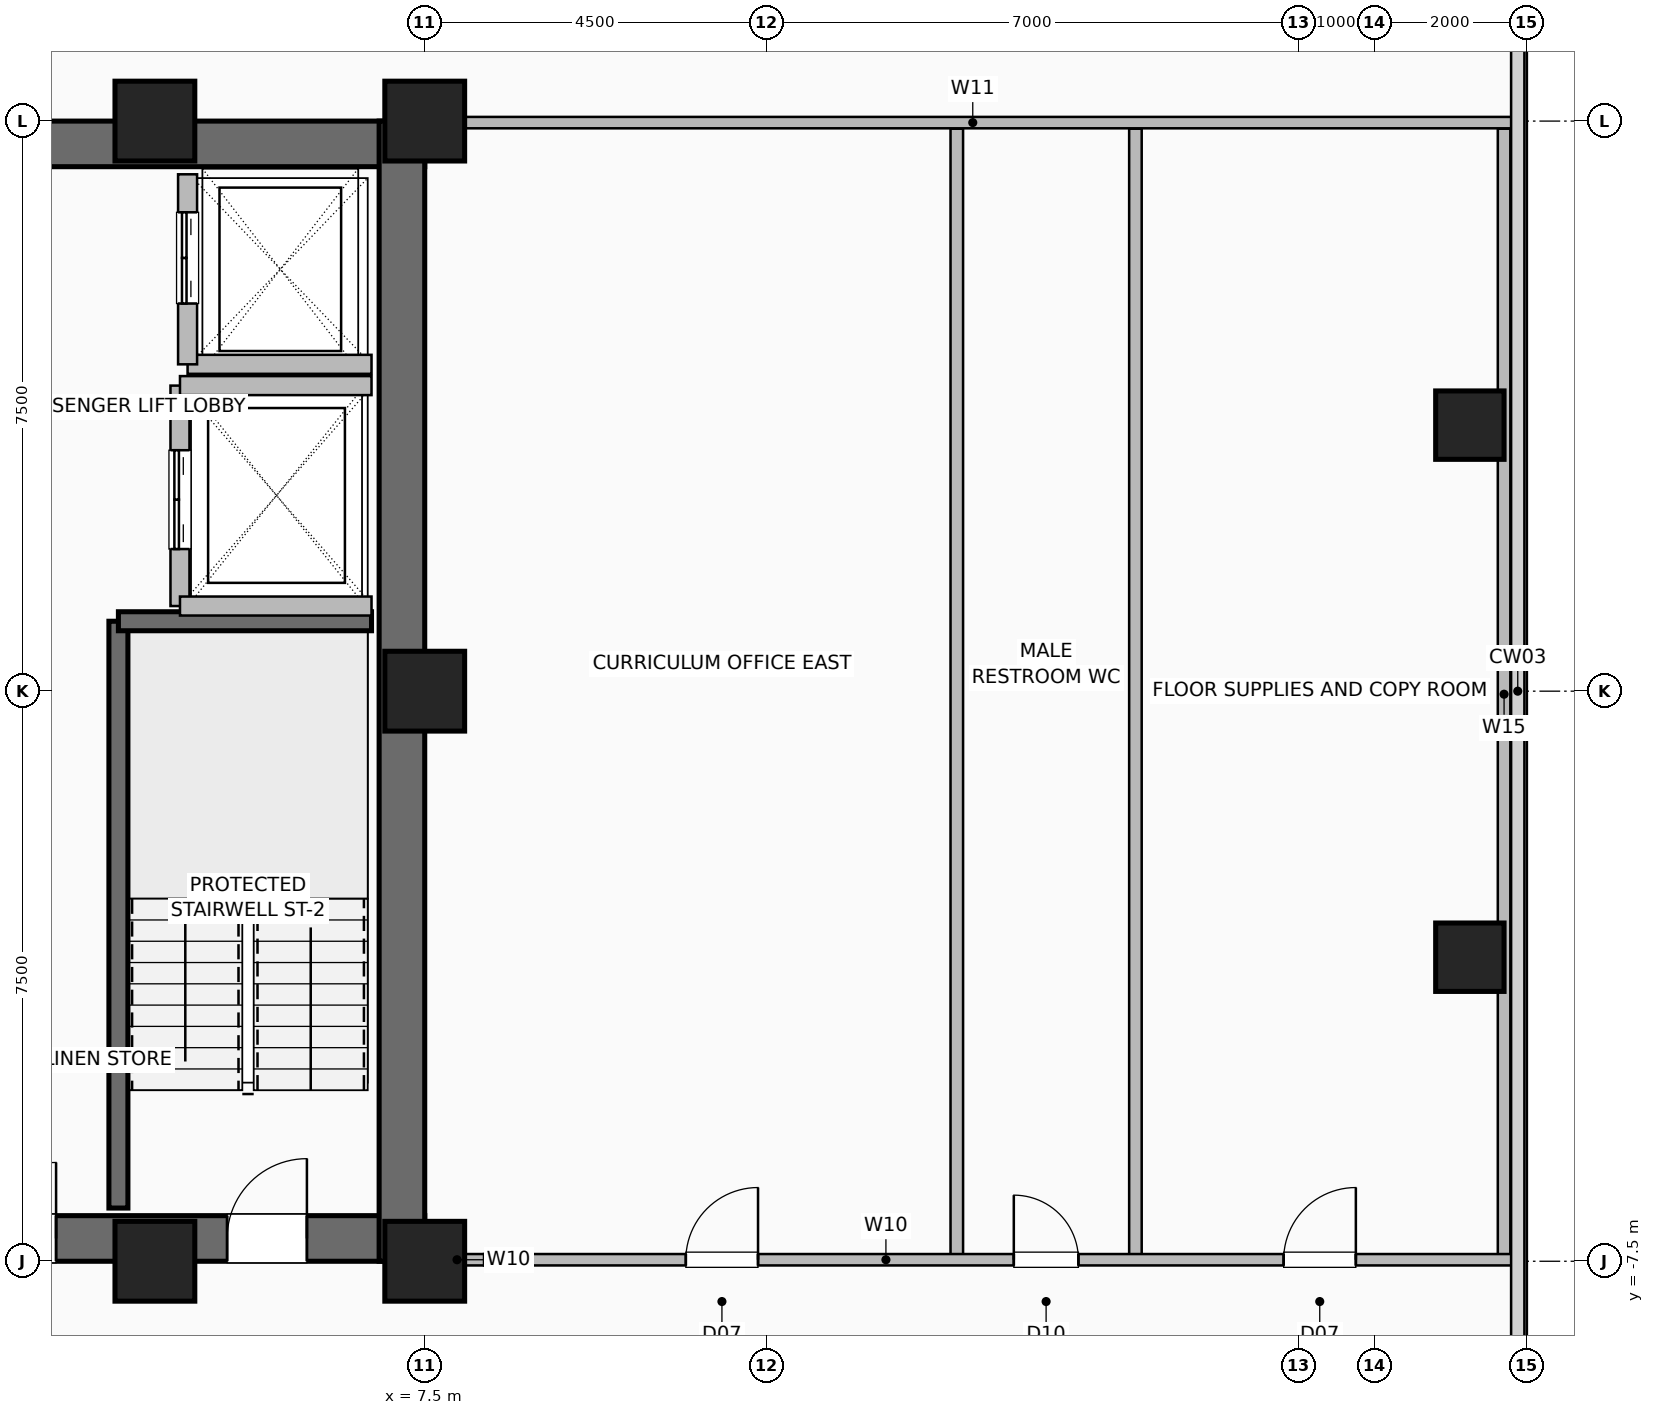
"""IFC4 building model, lengths in metres.
Left out: names, types, materials, properties, quantities, classifications, styles, units other than length and angle.
Written with IfcOpenShell. Run it as: python <this file> out.ifc"""

import sys

from ifc_helpers import new_model, si_unit, direction, frame, frame_2d, origin, origin_2d, place, context, subcontext, project, spatial, rectangle, hollow_rectangle, extrude, element, fill, save


model = new_model("IFC4")
c1 = context("Model", 3, precision=1e-05, world=origin(), true_north=direction((0.0, 1.0)))
c2 = subcontext(c1, "Body", "Model", "MODEL_VIEW")
j1 = project(units=[si_unit("LENGTHUNIT", "METRE"), si_unit("PLANEANGLEUNIT", "RADIAN")], contexts=[c1])
p1 = place(None, origin())
s1 = spatial("IfcSite", under=j1, at=p1, CompositionType="ELEMENT")
p2 = place(p1, origin())
s2 = spatial("IfcBuilding", under=s1, at=p2, CompositionType="ELEMENT")
p3 = place(p2, frame((0.0, 0.0, 130.0)))
s3 = spatial("IfcBuildingStorey", under=s2, at=p3, CompositionType="ELEMENT", Elevation=130.0)
for number, where, z_axis, x_axis in (
    (1, (3.95, -7.5, 0.0), (0.0, 0.0, 1.0), (1.0, 0.0, 0.0)),
    (2, (7.5, -7.5, 0.0), (0.0, 0.0, 1.0), (1.0, 0.0, 0.0)),
    (3, (7.5, 0.0, 0.0), (0.0, 0.0, 1.0), (1.0, 0.0, 0.0)),
    (4, (7.5, 7.5, 0.0), (0.0, 0.0, 1.0), (1.0, 0.0, 0.0)),
    (5, (3.95, 7.5, 0.0), (0.0, 0.0, 1.0), (1.0, 0.0, 0.0)),
):
    element("IfcColumn", number, at=place(p3, frame(where, z_axis=z_axis, x_axis=x_axis)), inside=s3, PredefinedType="COLUMN", context=c2, shape_type="SweptSolid", body=[
        extrude(hollow_rectangle(XDim=1.05, YDim=1.05, WallThickness=0.05, at=origin_2d()), origin(), (0.0, 0.0, 1.0), 3.6),
    ])
for number, where, z_axis, x_axis in (
    (6, (21.25, -3.5, 0.0), (0.0, 0.0, 1.0), (1.0, 0.0, 0.0)),
    (7, (21.25, 3.5, 0.0), (0.0, 0.0, 1.0), (1.0, 0.0, 0.0)),
):
    element("IfcColumn", number, at=place(p3, frame(where, z_axis=z_axis, x_axis=x_axis)), inside=s3, PredefinedType="COLUMN", context=c2, shape_type="SweptSolid", body=[
        extrude(hollow_rectangle(XDim=0.9, YDim=0.9, WallThickness=0.045, at=origin_2d()), origin(), (0.0, 0.0, 1.0), 3.6),
    ])
p4 = place(p3, frame((-7.5, -7.2, 0.0), z_axis=(0.0, 0.0, 1.0), x_axis=(1.0, 0.0, 0.0)))
e8 = element("IfcWall", 8, at=p4, inside=s3, PredefinedType="SHEAR", context=c2, shape_type="SweptSolid", body=[
    extrude(rectangle(XDim=15.0, YDim=0.6, at=frame_2d((7.5, 0.0))), origin(), (0.0, 0.0, 1.0), 3.36),
])
p5 = place(p4, frame((1.55, 0.0, 0.0)))
e9 = element("IfcOpeningElement", 9, at=p5, cuts=e8, PredefinedType="OPENING", context=c2, shape_type="SweptSolid", body=[
    extrude(rectangle(XDim=1.05, YDim=2.08, at=frame_2d((0.525, 1.04))), frame((0.0, 0.31, 0.0), z_axis=(0.0, -1.0, 0.0), x_axis=(1.0, 0.0, 0.0)), (0.0, 0.0, 1.0), 0.62),
])
p6 = place(p4, frame((12.4, 0.0, 0.0)))
e10 = element("IfcOpeningElement", 10, at=p6, cuts=e8, PredefinedType="OPENING", context=c2, shape_type="SweptSolid", body=[
    extrude(rectangle(XDim=1.05, YDim=2.08, at=frame_2d((0.525, 1.04))), frame((0.0, 0.31, 0.0), z_axis=(0.0, -1.0, 0.0), x_axis=(1.0, 0.0, 0.0)), (0.0, 0.0, 1.0), 0.62),
])
p7 = place(p4, frame((4.95, 0.0, 0.0)))
e11 = element("IfcOpeningElement", 11, at=p7, cuts=e8, PredefinedType="OPENING", context=c2, shape_type="SweptSolid", body=[
    extrude(rectangle(XDim=1.0, YDim=2.08, at=frame_2d((0.5, 1.04))), frame((0.0, 0.31, 0.0), z_axis=(0.0, -1.0, 0.0), x_axis=(1.0, 0.0, 0.0)), (0.0, 0.0, 1.0), 0.62),
])
p8 = place(p4, frame((7.05, 0.0, 0.0)))
e12 = element("IfcOpeningElement", 12, at=p8, cuts=e8, PredefinedType="OPENING", context=c2, shape_type="SweptSolid", body=[
    extrude(rectangle(XDim=1.0, YDim=2.08, at=frame_2d((0.5, 1.04))), frame((0.0, 0.31, 0.0), z_axis=(0.0, -1.0, 0.0), x_axis=(1.0, 0.0, 0.0)), (0.0, 0.0, 1.0), 0.62),
])
p9 = place(p4, frame((9.15, 0.0, 0.0)))
e13 = element("IfcOpeningElement", 13, at=p9, cuts=e8, PredefinedType="OPENING", context=c2, shape_type="SweptSolid", body=[
    extrude(rectangle(XDim=1.0, YDim=2.08, at=frame_2d((0.5, 1.04))), frame((0.0, 0.31, 0.0), z_axis=(0.0, -1.0, 0.0), x_axis=(1.0, 0.0, 0.0)), (0.0, 0.0, 1.0), 0.62),
])
for number, where, z_axis, x_axis in (
    (14, (-7.5, 7.2, 0.0), (0.0, 0.0, 1.0), (1.0, 0.0, 0.0)),
    (15, (7.2, -7.5, 0.0), (0.0, 0.0, 1.0), (0.0, 1.0, 0.0)),
):
    element("IfcWall", number, at=place(p3, frame(where, z_axis=z_axis, x_axis=x_axis)), inside=s3, PredefinedType="SHEAR", context=c2, shape_type="SweptSolid", body=[
        extrude(rectangle(XDim=15.0, YDim=0.6, at=frame_2d((7.5, 0.0))), origin(), (0.0, 0.0, 1.0), 3.36),
    ])
p10 = place(p3, frame((3.47, -6.8, 0.0), z_axis=(0.0, 0.0, 1.0), x_axis=(0.0, 1.0, 0.0)))
e16 = element("IfcWall", 16, at=p10, inside=s3, PredefinedType="SHEAR", context=c2, shape_type="SweptSolid", body=[
    extrude(rectangle(XDim=7.72, YDim=0.25, at=frame_2d((3.86, 0.0))), origin(), (0.0, 0.0, 1.0), 3.36),
])
p11 = place(p3, frame((3.47, 0.92, 0.0), z_axis=(0.0, 0.0, 1.0), x_axis=(1.0, 0.0, 0.0)))
e17 = element("IfcWall", 17, at=p11, inside=s3, PredefinedType="SHEAR", context=c2, shape_type="SweptSolid", body=[
    extrude(rectangle(XDim=3.33, YDim=0.25, at=frame_2d((1.665, 0.0))), origin(), (0.0, 0.0, 1.0), 3.36),
])
p12 = place(p3, frame((4.38, 4.3, 0.0), z_axis=(0.0, 0.0, 1.0), x_axis=(1.0, 0.0, 0.0)))
e18 = element("IfcWall", 18, at=p12, inside=s3, PredefinedType="SHEAR", context=c2, shape_type="SweptSolid", body=[
    extrude(rectangle(XDim=2.42, YDim=0.25, at=frame_2d((1.21, 0.0))), origin(), (0.0, 0.0, 1.0), 3.36),
])
p13 = place(p3, frame((4.38, 4.3, 0.0), z_axis=(0.0, 0.0, 1.0), x_axis=(0.0, 1.0, 0.0)))
e19 = element("IfcWall", 19, at=p13, inside=s3, PredefinedType="SHEAR", context=c2, shape_type="SweptSolid", body=[
    extrude(rectangle(XDim=2.5, YDim=0.25, at=frame_2d((1.25, 0.0))), origin(), (0.0, 0.0, 1.0), 3.36),
])
p14 = place(p13, frame((0.8, 0.0, 0.0)))
e20 = element("IfcOpeningElement", 20, at=p14, cuts=e19, PredefinedType="OPENING", context=c2, shape_type="SweptSolid", body=[
    extrude(rectangle(XDim=1.2, YDim=2.2, at=frame_2d((0.6, 1.1))), frame((0.0, 0.135, 0.0), z_axis=(0.0, -1.0, 0.0), x_axis=(1.0, 0.0, 0.0)), (0.0, 0.0, 1.0), 0.27),
])
p15 = place(p3, frame((4.28, 1.12, 0.0), z_axis=(0.0, 0.0, 1.0), x_axis=(0.0, 1.0, 0.0)))
e21 = element("IfcWall", 21, at=p15, inside=s3, PredefinedType="SHEAR", context=c2, shape_type="SweptSolid", body=[
    extrude(rectangle(XDim=2.9, YDim=0.25, at=frame_2d((1.45, 0.0))), origin(), (0.0, 0.0, 1.0), 3.36),
])
p16 = place(p15, frame((0.75, 0.0, 0.0)))
e22 = element("IfcOpeningElement", 22, at=p16, cuts=e21, PredefinedType="OPENING", context=c2, shape_type="SweptSolid", body=[
    extrude(rectangle(XDim=1.3, YDim=2.3, at=frame_2d((0.65, 1.15))), frame((0.0, 0.135, 0.0), z_axis=(0.0, -1.0, 0.0), x_axis=(1.0, 0.0, 0.0)), (0.0, 0.0, 1.0), 0.27),
])
for number, where, z_axis, x_axis in (
    (23, (4.28, 1.12, 0.0), (0.0, 0.0, 1.0), (1.0, 0.0, 0.0)),
    (24, (4.28, 4.02, 0.0), (0.0, 0.0, 1.0), (1.0, 0.0, 0.0)),
):
    element("IfcWall", number, at=place(p3, frame(where, z_axis=z_axis, x_axis=x_axis)), inside=s3, PredefinedType="SHEAR", context=c2, shape_type="SweptSolid", body=[
        extrude(rectangle(XDim=2.52, YDim=0.25, at=frame_2d((1.26, 0.0))), origin(), (0.0, 0.0, 1.0), 3.36),
    ])
p17 = place(p3, frame((7.45, -7.48, 0.0), z_axis=(0.0, 0.0, 1.0), x_axis=(1.0, 0.0, 0.0)))
e25 = element("IfcWall", 25, at=p17, inside=s3, PredefinedType="PARTITIONING", context=c2, shape_type="SweptSolid", body=[
    extrude(rectangle(XDim=0.95, YDim=0.15, at=frame_2d((0.475, 0.0))), origin(), (0.0, 0.0, 1.0), 3.36),
])
for number, where, z_axis, x_axis in (
    (26, (16.85, -7.48, 0.0), (0.0, 0.0, 1.0), (0.0, 1.0, 0.0)),
    (27, (14.5, -7.48, 0.0), (0.0, 0.0, 1.0), (0.0, 1.0, 0.0)),
    (28, (21.7, -7.48, 0.0), (0.0, 0.0, 1.0), (0.0, 1.0, 0.0)),
):
    element("IfcWall", number, at=place(p3, frame(where, z_axis=z_axis, x_axis=x_axis)), inside=s3, PredefinedType="PLUMBINGWALL", context=c2, shape_type="SweptSolid", body=[
        extrude(rectangle(XDim=14.88, YDim=0.165, at=frame_2d((7.44, 0.0))), origin(), (0.0, 0.0, 1.0), 3.36),
    ])
p18 = place(p3, frame((8.28, -7.48, 0.0), z_axis=(0.0, 0.0, 1.0), x_axis=(1.0, 0.0, 0.0)))
e29 = element("IfcWall", 29, at=p18, inside=s3, PredefinedType="PARTITIONING", context=c2, shape_type="SweptSolid", body=[
    extrude(rectangle(XDim=13.54, YDim=0.15, at=frame_2d((6.77, 0.0))), origin(), (0.0, 0.0, 1.0), 3.36),
])
p19 = place(p18, frame((2.655, 0.0, 0.0)))
e30 = element("IfcOpeningElement", 30, at=p19, cuts=e29, PredefinedType="OPENING", context=c2, shape_type="SweptSolid", body=[
    extrude(rectangle(XDim=0.95, YDim=2.06, at=frame_2d((0.475, 1.03))), frame((0.0, 0.085, 0.0), z_axis=(0.0, -1.0, 0.0), x_axis=(1.0, 0.0, 0.0)), (0.0, 0.0, 1.0), 0.17),
])
p20 = place(p18, frame((6.97, 0.0, 0.0)))
e31 = element("IfcOpeningElement", 31, at=p20, cuts=e29, PredefinedType="OPENING", context=c2, shape_type="SweptSolid", body=[
    extrude(rectangle(XDim=0.85, YDim=2.05, at=frame_2d((0.425, 1.025))), frame((0.0, 0.085, 0.0), z_axis=(0.0, -1.0, 0.0), x_axis=(1.0, 0.0, 0.0)), (0.0, 0.0, 1.0), 0.17),
])
p21 = place(p18, frame((10.52, 0.0, 0.0)))
e32 = element("IfcOpeningElement", 32, at=p21, cuts=e29, PredefinedType="OPENING", context=c2, shape_type="SweptSolid", body=[
    extrude(rectangle(XDim=0.95, YDim=2.06, at=frame_2d((0.475, 1.03))), frame((0.0, 0.085, 0.0), z_axis=(0.0, -1.0, 0.0), x_axis=(1.0, 0.0, 0.0)), (0.0, 0.0, 1.0), 0.17),
])
p22 = place(p3, frame((7.6, 7.48, 0.0), z_axis=(0.0, 0.0, 1.0), x_axis=(1.0, 0.0, 0.0)))
e33 = element("IfcWall", 33, at=p22, inside=s3, PredefinedType="PARTITIONING", context=c2, shape_type="SweptSolid", body=[
    extrude(rectangle(XDim=14.22, YDim=0.15, at=frame_2d((7.11, 0.0))), origin(), (0.0, 0.0, 1.0), 3.36),
])
p23 = place(p6, origin())
e34 = element("IfcDoor", 34, at=p23, inside=s3, OperationType="SINGLE_SWING_RIGHT", PredefinedType="DOOR", context=c2, shape_type="SweptSolid", body=[
    extrude(rectangle(XDim=1.05, YDim=2.08, at=frame_2d((0.525, 1.04))), frame((0.0, 0.025, 0.0), z_axis=(0.0, -1.0, 0.0), x_axis=(1.0, 0.0, 0.0)), (0.0, 0.0, 1.0), 0.05),
])
fill(e10, e34)
p24 = place(p9, origin())
e35 = element("IfcDoor", 35, at=p24, inside=s3, OperationType="SINGLE_SWING_RIGHT", PredefinedType="DOOR", context=c2, shape_type="SweptSolid", body=[
    extrude(rectangle(XDim=1.0, YDim=2.08, at=frame_2d((0.5, 1.04))), frame((0.0, 0.025, 0.0), z_axis=(0.0, -1.0, 0.0), x_axis=(1.0, 0.0, 0.0)), (0.0, 0.0, 1.0), 0.05),
])
fill(e13, e35)
p25 = place(p14, origin())
e36 = element("IfcDoor", 36, at=p25, inside=s3, OperationType="DOUBLE_DOOR_SLIDING", PredefinedType="DOOR", context=c2, shape_type="SweptSolid", body=[
    extrude(rectangle(XDim=1.2, YDim=2.2, at=frame_2d((0.6, 1.1))), frame((0.0, 0.025, 0.0), z_axis=(0.0, -1.0, 0.0), x_axis=(1.0, 0.0, 0.0)), (0.0, 0.0, 1.0), 0.05),
])
fill(e20, e36)
p26 = place(p16, origin())
e37 = element("IfcDoor", 37, at=p26, inside=s3, OperationType="DOUBLE_DOOR_SLIDING", PredefinedType="DOOR", context=c2, shape_type="SweptSolid", body=[
    extrude(rectangle(XDim=1.3, YDim=2.3, at=frame_2d((0.65, 1.15))), frame((0.0, 0.025, 0.0), z_axis=(0.0, -1.0, 0.0), x_axis=(1.0, 0.0, 0.0)), (0.0, 0.0, 1.0), 0.05),
])
fill(e22, e37)
p27 = place(p19, origin())
e38 = element("IfcDoor", 38, at=p27, inside=s3, OperationType="SINGLE_SWING_RIGHT", PredefinedType="DOOR", context=c2, shape_type="SweptSolid", body=[
    extrude(rectangle(XDim=0.95, YDim=2.06, at=frame_2d((0.475, 1.03))), frame((0.0, 0.025, 0.0), z_axis=(0.0, -1.0, 0.0), x_axis=(1.0, 0.0, 0.0)), (0.0, 0.0, 1.0), 0.05),
])
fill(e30, e38)
p28 = place(p20, origin())
e39 = element("IfcDoor", 39, at=p28, inside=s3, OperationType="SINGLE_SWING_LEFT", PredefinedType="DOOR", context=c2, shape_type="SweptSolid", body=[
    extrude(rectangle(XDim=0.85, YDim=2.05, at=frame_2d((0.425, 1.025))), frame((0.0, 0.025, 0.0), z_axis=(0.0, -1.0, 0.0), x_axis=(1.0, 0.0, 0.0)), (0.0, 0.0, 1.0), 0.05),
])
fill(e31, e39)
p29 = place(p21, origin())
e40 = element("IfcDoor", 40, at=p29, inside=s3, OperationType="SINGLE_SWING_RIGHT", PredefinedType="DOOR", context=c2, shape_type="SweptSolid", body=[
    extrude(rectangle(XDim=0.95, YDim=2.06, at=frame_2d((0.475, 1.03))), frame((0.0, 0.025, 0.0), z_axis=(0.0, -1.0, 0.0), x_axis=(1.0, 0.0, 0.0)), (0.0, 0.0, 1.0), 0.05),
])
fill(e32, e40)
save(model, sys.argv[1])
